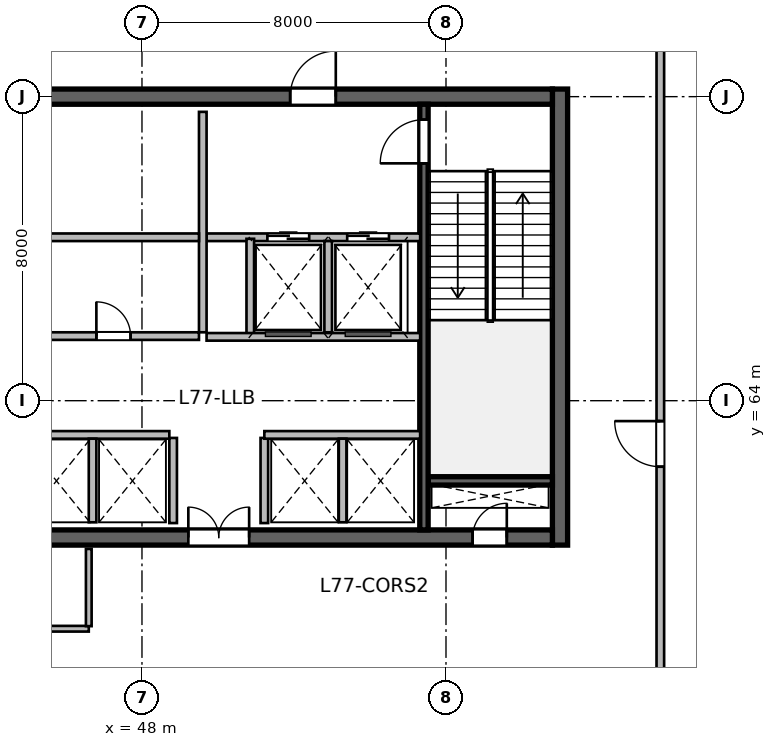
"""IFC4 building model, lengths in metres.
Left out: names, types, materials, properties, quantities, classifications, styles, units other than length and angle.
Written with IfcOpenShell. Run it as: python <this file> out.ifc"""

import sys

from ifc_helpers import new_model, si_unit, direction, frame, frame_2d, origin, place, context, subcontext, project, spatial, rectangle, extrude, source, transform, mapped, element, fill, save


model = new_model("IFC4")
c1 = context("Model", 3, precision=1e-05, world=origin(), true_north=direction((0.0, 1.0)))
c2 = subcontext(c1, "Body", "Model", "MODEL_VIEW")
j1 = project(units=[si_unit("LENGTHUNIT", "METRE"), si_unit("PLANEANGLEUNIT", "RADIAN")], contexts=[c1])
p1 = place(None, origin())
s1 = spatial("IfcSite", under=j1, at=p1, CompositionType="ELEMENT")
p2 = place(p1, origin())
s2 = spatial("IfcBuilding", under=s1, at=p2, CompositionType="ELEMENT")
p3 = place(p2, frame((0.0, 0.0, 318.0)))
s3 = spatial("IfcBuildingStorey", under=s2, at=p3, CompositionType="ELEMENT", Elevation=318.0)
m1 = source(origin(), c2, "Body", "SweptSolid", [
    extrude(rectangle(XDim=12.0, YDim=0.4, at=frame_2d((6.0, 0.0))), origin(), (0.0, 0.0, 1.0), 5.4),
])
p4 = place(p3, frame((59.0, 60.2, 0.0), z_axis=(0.0, 0.0, 1.0), x_axis=(0.0, 1.0, 0.0)))
e1 = element("IfcWall", 1, at=p4, inside=s3, PredefinedType="SHEAR", context=c2, shape_type="MappedRepresentation", body=[
    mapped(m1, transform((0.0, 0.0, 0.0), scale=1.0)),
])
m2 = source(origin(), c2, "Body", "SweptSolid", [
    extrude(rectangle(XDim=21.6, YDim=0.4, at=frame_2d((10.8, 0.0))), origin(), (0.0, 0.0, 1.0), 5.4),
])
p5 = place(p3, frame((37.2, 60.4, 0.0), z_axis=(0.0, 0.0, 1.0), x_axis=(1.0, 0.0, 0.0)))
e2 = element("IfcWall", 2, at=p5, inside=s3, PredefinedType="SHEAR", context=c2, shape_type="MappedRepresentation", body=[
    mapped(m2, transform((0.0, 0.0, 0.0), scale=1.0)),
])
p6 = place(p5, frame((1.1, 0.0, 0.0)))
e3 = element("IfcOpeningElement", 3, at=p6, cuts=e2, PredefinedType="OPENING", context=c2, shape_type="SweptSolid", body=[
    extrude(rectangle(XDim=1.15, YDim=2.15, at=frame_2d((0.575, 1.075))), frame((0.0, 0.21, 0.0), z_axis=(0.0, -1.0, 0.0), x_axis=(1.0, 0.0, 0.0)), (0.0, 0.0, 1.0), 0.42),
])
p7 = place(p5, frame((19.5, 0.0, 0.0)))
e4 = element("IfcOpeningElement", 4, at=p7, cuts=e2, PredefinedType="OPENING", context=c2, shape_type="SweptSolid", body=[
    extrude(rectangle(XDim=0.9, YDim=2.1, at=frame_2d((0.45, 1.05))), frame((0.0, 0.21, 0.0), z_axis=(0.0, -1.0, 0.0), x_axis=(1.0, 0.0, 0.0)), (0.0, 0.0, 1.0), 0.42),
])
p8 = place(p5, frame((12.02, 0.0, 0.0)))
e5 = element("IfcOpeningElement", 5, at=p8, cuts=e2, PredefinedType="OPENING", context=c2, shape_type="SweptSolid", body=[
    extrude(rectangle(XDim=1.6, YDim=2.15, at=frame_2d((0.8, 1.075))), frame((0.0, 0.21, 0.0), z_axis=(0.0, -1.0, 0.0), x_axis=(1.0, 0.0, 0.0)), (0.0, 0.0, 1.0), 0.42),
])
p9 = place(p3, frame((37.2, 72.0, 0.0), z_axis=(0.0, 0.0, 1.0), x_axis=(1.0, 0.0, 0.0)))
e6 = element("IfcWall", 6, at=p9, inside=s3, PredefinedType="SHEAR", context=c2, shape_type="MappedRepresentation", body=[
    mapped(m2, transform((0.0, 0.0, 0.0), scale=1.0)),
])
p10 = place(p9, frame((1.2, 0.0, 0.0)))
e7 = element("IfcOpeningElement", 7, at=p10, cuts=e6, PredefinedType="OPENING", context=c2, shape_type="SweptSolid", body=[
    extrude(rectangle(XDim=0.9, YDim=2.1, at=frame_2d((0.45, 1.05))), frame((0.0, 0.21, 0.0), z_axis=(0.0, -1.0, 0.0), x_axis=(1.0, 0.0, 0.0)), (0.0, 0.0, 1.0), 0.42),
])
p11 = place(p9, frame((14.7, 0.0, 0.0)))
e8 = element("IfcOpeningElement", 8, at=p11, cuts=e6, PredefinedType="OPENING", context=c2, shape_type="SweptSolid", body=[
    extrude(rectangle(XDim=1.2, YDim=2.15, at=frame_2d((0.6, 1.075))), frame((0.0, 0.21, 0.0), z_axis=(0.0, -1.0, 0.0), x_axis=(1.0, 0.0, 0.0)), (0.0, 0.0, 1.0), 0.42),
])
p12 = place(p9, frame((4.15, 0.0, 0.0)))
e9 = element("IfcOpeningElement", 9, at=p12, cuts=e6, PredefinedType="OPENING", context=c2, shape_type="SweptSolid", body=[
    extrude(rectangle(XDim=1.3, YDim=2.15, at=frame_2d((0.65, 1.075))), frame((0.0, 0.21, 0.0), z_axis=(0.0, -1.0, 0.0), x_axis=(1.0, 0.0, 0.0)), (0.0, 0.0, 1.0), 0.42),
])
p13 = place(p9, frame((7.25, 0.0, 0.0)))
e10 = element("IfcOpeningElement", 10, at=p13, cuts=e6, PredefinedType="OPENING", context=c2, shape_type="SweptSolid", body=[
    extrude(rectangle(XDim=0.9, YDim=2.1, at=frame_2d((0.45, 1.05))), frame((0.0, 0.21, 0.0), z_axis=(0.0, -1.0, 0.0), x_axis=(1.0, 0.0, 0.0)), (0.0, 0.0, 1.0), 0.42),
])
m3 = source(origin(), c2, "Body", "SweptSolid", [
    extrude(rectangle(XDim=3.27, YDim=0.22, at=frame_2d((1.635, 0.0))), origin(), (0.0, 0.0, 1.0), 5.4),
])
p14 = place(p3, frame((55.53, 61.89, 0.0), z_axis=(0.0, 0.0, 1.0), x_axis=(1.0, 0.0, 0.0)))
e11 = element("IfcWall", 11, at=p14, inside=s3, PredefinedType="SHEAR", context=c2, shape_type="MappedRepresentation", body=[
    mapped(m3, transform((0.0, 0.0, 0.0), scale=1.0)),
])
m4 = source(origin(), c2, "Body", "SweptSolid", [
    extrude(rectangle(XDim=11.2, YDim=0.22, at=frame_2d((5.6, 0.0))), origin(), (0.0, 0.0, 1.0), 5.4),
])
p15 = place(p3, frame((55.42, 60.6, 0.0), z_axis=(0.0, 0.0, 1.0), x_axis=(0.0, 1.0, 0.0)))
e12 = element("IfcWall", 12, at=p15, inside=s3, PredefinedType="SHEAR", context=c2, shape_type="MappedRepresentation", body=[
    mapped(m4, transform((0.0, 0.0, 0.0), scale=1.0)),
])
p16 = place(p15, frame((9.645, 0.0, 0.0)))
e13 = element("IfcOpeningElement", 13, at=p16, cuts=e12, PredefinedType="OPENING", context=c2, shape_type="SweptSolid", body=[
    extrude(rectangle(XDim=1.15, YDim=2.15, at=frame_2d((0.575, 1.075))), frame((0.0, 0.12, 0.0), z_axis=(0.0, -1.0, 0.0), x_axis=(1.0, 0.0, 0.0)), (0.0, 0.0, 1.0), 0.24),
])
m5 = source(origin(), c2, "Body", "SweptSolid", [
    extrude(rectangle(XDim=1.972, YDim=0.3, at=frame_2d((0.986, 0.0))), origin(), (0.0, 0.0, 1.0), 5.12),
])
p17 = place(p3, frame((62.62, 73.7, 0.0), z_axis=(0.0, 0.0, 1.0), x_axis=(0.878387239208, -0.477949639603, 0.0)))
e14 = element("IfcWall", 14, at=p17, inside=s3, PredefinedType="SOLIDWALL", context=c2, shape_type="MappedRepresentation", body=[
    mapped(m5, transform((0.0, 0.0, 0.0), scale=1.0)),
])
m6 = source(origin(), c2, "Body", "SweptSolid", [
    extrude(rectangle(XDim=2.24, YDim=0.2, at=frame_2d((1.12, 0.0))), origin(), (0.0, 0.0, 1.0), 5.12),
])
for number, where, z_axis, x_axis in (
    (15, (48.82, 60.78, 0.0), (0.0, 0.0, 1.0), (0.0, 1.0, 0.0)),
    (16, (51.22, 60.78, 0.0), (0.0, 0.0, 1.0), (0.0, 1.0, 0.0)),
):
    element("IfcWall", number, at=place(p3, frame(where, z_axis=z_axis, x_axis=x_axis)), inside=s3, PredefinedType="SOLIDWALL", context=c2, shape_type="MappedRepresentation", body=[
        mapped(m6, transform((0.0, 0.0, 0.0), scale=1.0)),
    ])
m7 = source(origin(), c2, "Body", "SweptSolid", [
    extrude(rectangle(XDim=5.62, YDim=0.2, at=frame_2d((2.81, 0.0))), origin(), (0.0, 0.0, 1.0), 5.12),
])
p18 = place(p3, frame((49.7, 68.3, 0.0), z_axis=(0.0, 0.0, 1.0), x_axis=(1.0, 0.0, 0.0)))
e17 = element("IfcWall", 17, at=p18, inside=s3, PredefinedType="SOLIDWALL", context=c2, shape_type="MappedRepresentation", body=[
    mapped(m7, transform((0.0, 0.0, 0.0), scale=1.0)),
])
p19 = place(p18, frame((1.6, 0.0, 0.0)))
e18 = element("IfcOpeningElement", 18, at=p19, cuts=e17, PredefinedType="OPENING", context=c2, shape_type="SweptSolid", body=[
    extrude(rectangle(XDim=1.1, YDim=2.15, at=frame_2d((0.55, 1.075))), frame((0.0, 0.11, 0.0), z_axis=(0.0, -1.0, 0.0), x_axis=(1.0, 0.0, 0.0)), (0.0, 0.0, 1.0), 0.22),
])
p20 = place(p18, frame((3.7, 0.0, 0.0)))
e19 = element("IfcOpeningElement", 19, at=p20, cuts=e17, PredefinedType="OPENING", context=c2, shape_type="SweptSolid", body=[
    extrude(rectangle(XDim=1.1, YDim=2.15, at=frame_2d((0.55, 1.075))), frame((0.0, 0.11, 0.0), z_axis=(0.0, -1.0, 0.0), x_axis=(1.0, 0.0, 0.0)), (0.0, 0.0, 1.0), 0.22),
])
m8 = source(origin(), c2, "Body", "SweptSolid", [
    extrude(rectangle(XDim=5.8, YDim=0.2, at=frame_2d((2.9, 0.0))), origin(), (0.0, 0.0, 1.0), 5.12),
])
p21 = place(p3, frame((49.6, 65.8, 0.0), z_axis=(0.0, 0.0, 1.0), x_axis=(0.0, 1.0, 0.0)))
e20 = element("IfcWall", 20, at=p21, inside=s3, PredefinedType="SOLIDWALL", context=c2, shape_type="MappedRepresentation", body=[
    mapped(m8, transform((0.0, 0.0, 0.0), scale=1.0)),
])
m9 = source(origin(), c2, "Body", "SweptSolid", [
    extrude(rectangle(XDim=2.58, YDim=0.2, at=frame_2d((1.29, 0.0))), origin(), (0.0, 0.0, 1.0), 5.12),
])
p22 = place(p3, frame((50.85, 65.68, 0.0), z_axis=(0.0, 0.0, 1.0), x_axis=(0.0, 1.0, 0.0)))
e21 = element("IfcWall", 21, at=p22, inside=s3, PredefinedType="SOLIDWALL", context=c2, shape_type="MappedRepresentation", body=[
    mapped(m9, transform((0.0, 0.0, 0.0), scale=1.0)),
])
m10 = source(origin(), c2, "Body", "SweptSolid", [
    extrude(rectangle(XDim=2.4, YDim=0.2, at=frame_2d((1.2, 0.0))), origin(), (0.0, 0.0, 1.0), 5.12),
])
p23 = place(p3, frame((52.9, 65.8, 0.0), z_axis=(0.0, 0.0, 1.0), x_axis=(0.0, 1.0, 0.0)))
e22 = element("IfcWall", 22, at=p23, inside=s3, PredefinedType="SOLIDWALL", context=c2, shape_type="MappedRepresentation", body=[
    mapped(m10, transform((0.0, 0.0, 0.0), scale=1.0)),
])
p24 = place(p3, frame((49.7, 65.68, 0.0), z_axis=(0.0, 0.0, 1.0), x_axis=(1.0, 0.0, 0.0)))
e23 = element("IfcWall", 23, at=p24, inside=s3, PredefinedType="SOLIDWALL", context=c2, shape_type="MappedRepresentation", body=[
    mapped(m7, transform((0.0, 0.0, 0.0), scale=1.0)),
])
m11 = source(origin(), c2, "Body", "SweptSolid", [
    extrude(rectangle(XDim=8.8, YDim=0.2, at=frame_2d((4.4, 0.0))), origin(), (0.0, 0.0, 1.0), 5.12),
])
p25 = place(p3, frame((40.7, 68.3, 0.0), z_axis=(0.0, 0.0, 1.0), x_axis=(1.0, 0.0, 0.0)))
e24 = element("IfcWall", 24, at=p25, inside=s3, PredefinedType="SOLIDWALL", context=c2, shape_type="MappedRepresentation", body=[
    mapped(m11, transform((0.0, 0.0, 0.0), scale=1.0)),
])
m12 = source(origin(), c2, "Body", "SweptSolid", [
    extrude(rectangle(XDim=8.02, YDim=0.2, at=frame_2d((4.01, 0.0))), origin(), (0.0, 0.0, 1.0), 5.12),
])
p26 = place(p3, frame((40.7, 63.1, 0.0), z_axis=(0.0, 0.0, 1.0), x_axis=(1.0, 0.0, 0.0)))
e25 = element("IfcWall", 25, at=p26, inside=s3, PredefinedType="SOLIDWALL", context=c2, shape_type="MappedRepresentation", body=[
    mapped(m12, transform((0.0, 0.0, 0.0), scale=1.0)),
])
m13 = source(origin(), c2, "Body", "SweptSolid", [
    extrude(rectangle(XDim=4.1, YDim=0.2, at=frame_2d((2.05, 0.0))), origin(), (0.0, 0.0, 1.0), 5.12),
])
p27 = place(p3, frame((51.22, 63.1, 0.0), z_axis=(0.0, 0.0, 1.0), x_axis=(1.0, 0.0, 0.0)))
e26 = element("IfcWall", 26, at=p27, inside=s3, PredefinedType="SOLIDWALL", context=c2, shape_type="MappedRepresentation", body=[
    mapped(m13, transform((0.0, 0.0, 0.0), scale=1.0)),
])
m14 = source(origin(), c2, "Body", "SweptSolid", [
    extrude(rectangle(XDim=2.2, YDim=0.2, at=frame_2d((1.1, 0.0))), origin(), (0.0, 0.0, 1.0), 5.12),
])
for number, where, z_axis, x_axis in (
    (27, (46.7, 60.8, 0.0), (0.0, 0.0, 1.0), (0.0, 1.0, 0.0)),
    (28, (53.28, 60.8, 0.0), (0.0, 0.0, 1.0), (0.0, 1.0, 0.0)),
):
    element("IfcWall", number, at=place(p3, frame(where, z_axis=z_axis, x_axis=x_axis)), inside=s3, PredefinedType="SOLIDWALL", context=c2, shape_type="MappedRepresentation", body=[
        mapped(m14, transform((0.0, 0.0, 0.0), scale=1.0)),
    ])
p28 = place(p3, frame((40.7, 65.7, 0.0), z_axis=(0.0, 0.0, 1.0), x_axis=(1.0, 0.0, 0.0)))
e29 = element("IfcWall", 29, at=p28, inside=s3, PredefinedType="SOLIDWALL", context=c2, shape_type="MappedRepresentation", body=[
    mapped(m11, transform((0.0, 0.0, 0.0), scale=1.0)),
])
p29 = place(p28, frame((1.6, 0.0, 0.0)))
e30 = element("IfcOpeningElement", 30, at=p29, cuts=e29, PredefinedType="OPENING", context=c2, shape_type="SweptSolid", body=[
    extrude(rectangle(XDim=0.9, YDim=2.1, at=frame_2d((0.45, 1.05))), frame((0.0, 0.11, 0.0), z_axis=(0.0, -1.0, 0.0), x_axis=(1.0, 0.0, 0.0)), (0.0, 0.0, 1.0), 0.22),
])
p30 = place(p28, frame((6.1, 0.0, 0.0)))
e31 = element("IfcOpeningElement", 31, at=p30, cuts=e29, PredefinedType="OPENING", context=c2, shape_type="SweptSolid", body=[
    extrude(rectangle(XDim=0.9, YDim=2.1, at=frame_2d((0.45, 1.05))), frame((0.0, 0.11, 0.0), z_axis=(0.0, -1.0, 0.0), x_axis=(1.0, 0.0, 0.0)), (0.0, 0.0, 1.0), 0.22),
])
m15 = source(origin(), c2, "Body", "SweptSolid", [
    extrude(rectangle(XDim=5.4, YDim=0.15, at=frame_2d((2.7, 0.0))), origin(), (0.0, 0.0, 1.0), 5.12),
])
p31 = place(p3, frame((41.2, 58.0, 0.0), z_axis=(0.0, 0.0, 1.0), x_axis=(1.0, 0.0, 0.0)))
e32 = element("IfcWall", 32, at=p31, inside=s3, PredefinedType="PARTITIONING", context=c2, shape_type="MappedRepresentation", body=[
    mapped(m15, transform((0.0, 0.0, 0.0), scale=1.0)),
])
p32 = place(p31, frame((0.488, 0.0, 0.0)))
e33 = element("IfcOpeningElement", 33, at=p32, cuts=e32, PredefinedType="OPENING", context=c2, shape_type="SweptSolid", body=[
    extrude(rectangle(XDim=1.4, YDim=2.15, at=frame_2d((0.7, 1.075))), frame((0.0, 0.085, 0.0), z_axis=(0.0, -1.0, 0.0), x_axis=(1.0, 0.0, 0.0)), (0.0, 0.0, 1.0), 0.17),
])
m16 = source(origin(), c2, "Body", "SweptSolid", [
    extrude(rectangle(XDim=2.033, YDim=0.15, at=frame_2d((1.016, 0.0))), origin(), (0.0, 0.0, 1.0), 5.12),
])
p33 = place(p3, frame((46.6, 58.067, 0.0), z_axis=(0.0, 0.0, 1.0), x_axis=(0.0, 1.0, 0.0)))
e34 = element("IfcWall", 34, at=p33, inside=s3, PredefinedType="PARTITIONING", context=c2, shape_type="MappedRepresentation", body=[
    mapped(m16, transform((0.0, 0.0, 0.0), scale=1.0)),
])
m17 = source(origin(), c2, "Body", "SweptSolid", [
    extrude(rectangle(XDim=22.582, YDim=0.2, at=frame_2d((11.291, 0.0))), origin(), (0.0, 0.0, 1.0), 5.12),
])
p34 = place(p3, frame((61.64, 51.572, 0.0), z_axis=(0.0, 0.0, 1.0), x_axis=(0.0, 1.0, 0.0)))
e35 = element("IfcWall", 35, at=p34, inside=s3, PredefinedType="SOLIDWALL", context=c2, shape_type="MappedRepresentation", body=[
    mapped(m17, transform((0.0, 0.0, 0.0), scale=1.0)),
])
p35 = place(p34, frame((10.691, 0.0, 0.0)))
e36 = element("IfcOpeningElement", 36, at=p35, cuts=e35, PredefinedType="OPENING", context=c2, shape_type="SweptSolid", body=[
    extrude(rectangle(XDim=1.2, YDim=2.15, at=frame_2d((0.6, 1.075))), frame((0.0, 0.11, 0.0), z_axis=(0.0, -1.0, 0.0), x_axis=(1.0, 0.0, 0.0)), (0.0, 0.0, 1.0), 0.22),
])
m18 = source(origin(), c2, "Body", "SweptSolid", [
    extrude(rectangle(XDim=0.9, YDim=2.1, at=frame_2d((0.45, 1.05))), frame((0.0, 0.025, 0.0), z_axis=(0.0, -1.0, 0.0), x_axis=(1.0, 0.0, 0.0)), (0.0, 0.0, 1.0), 0.05),
])
p36 = place(p7, origin())
e37 = element("IfcDoor", 37, at=p36, inside=s3, OperationType="SINGLE_SWING_RIGHT", PredefinedType="DOOR", context=c2, shape_type="MappedRepresentation", body=[
    mapped(m18, transform((0.0, 0.0, 0.0), scale=1.0)),
])
fill(e4, e37)
m19 = source(origin(), c2, "Body", "SweptSolid", [
    extrude(rectangle(XDim=1.15, YDim=2.15, at=frame_2d((0.575, 1.075))), frame((0.0, 0.025, 0.0), z_axis=(0.0, -1.0, 0.0), x_axis=(1.0, 0.0, 0.0)), (0.0, 0.0, 1.0), 0.05),
])
p37 = place(p16, origin())
e38 = element("IfcDoor", 38, at=p37, inside=s3, OperationType="SINGLE_SWING_LEFT", PredefinedType="DOOR", context=c2, shape_type="MappedRepresentation", body=[
    mapped(m19, transform((0.0, 0.0, 0.0), scale=1.0)),
])
fill(e13, e38)
m20 = source(origin(), c2, "Body", "SweptSolid", [
    extrude(rectangle(XDim=1.6, YDim=2.15, at=frame_2d((0.8, 1.075))), frame((0.0, 0.025, 0.0), z_axis=(0.0, -1.0, 0.0), x_axis=(1.0, 0.0, 0.0)), (0.0, 0.0, 1.0), 0.05),
])
p38 = place(p8, origin())
e39 = element("IfcDoor", 39, at=p38, inside=s3, OperationType="DOUBLE_DOOR_SINGLE_SWING", PredefinedType="DOOR", context=c2, shape_type="MappedRepresentation", body=[
    mapped(m20, transform((0.0, 0.0, 0.0), scale=1.0)),
])
fill(e5, e39)
m21 = source(origin(), c2, "Body", "SweptSolid", [
    extrude(rectangle(XDim=1.2, YDim=2.15, at=frame_2d((0.6, 1.075))), frame((0.0, 0.025, 0.0), z_axis=(0.0, -1.0, 0.0), x_axis=(1.0, 0.0, 0.0)), (0.0, 0.0, 1.0), 0.05),
])
p39 = place(p11, origin())
e40 = element("IfcDoor", 40, at=p39, inside=s3, OperationType="SINGLE_SWING_RIGHT", PredefinedType="DOOR", context=c2, shape_type="MappedRepresentation", body=[
    mapped(m21, transform((0.0, 0.0, 0.0), scale=1.0)),
])
fill(e8, e40)
m22 = source(origin(), c2, "Body", "SweptSolid", [
    extrude(rectangle(XDim=1.1, YDim=2.15, at=frame_2d((0.55, 1.075))), frame((0.0, 0.025, 0.0), z_axis=(0.0, -1.0, 0.0), x_axis=(1.0, 0.0, 0.0)), (0.0, 0.0, 1.0), 0.05),
])
p40 = place(p19, origin())
e41 = element("IfcDoor", 41, at=p40, inside=s3, OperationType="DOUBLE_DOOR_SLIDING", PredefinedType="DOOR", context=c2, shape_type="MappedRepresentation", body=[
    mapped(m22, transform((0.0, 0.0, 0.0), scale=1.0)),
])
fill(e18, e41)
p41 = place(p20, origin())
e42 = element("IfcDoor", 42, at=p41, inside=s3, OperationType="DOUBLE_DOOR_SLIDING", PredefinedType="DOOR", context=c2, shape_type="MappedRepresentation", body=[
    mapped(m22, transform((0.0, 0.0, 0.0), scale=1.0)),
])
fill(e19, e42)
p42 = place(p30, origin())
e43 = element("IfcDoor", 43, at=p42, inside=s3, OperationType="SINGLE_SWING_LEFT", PredefinedType="DOOR", context=c2, shape_type="MappedRepresentation", body=[
    mapped(m18, transform((0.0, 0.0, 0.0), scale=1.0)),
])
fill(e31, e43)
p43 = place(p35, origin())
e44 = element("IfcDoor", 44, at=p43, inside=s3, OperationType="SINGLE_SWING_RIGHT", PredefinedType="DOOR", context=c2, shape_type="MappedRepresentation", body=[
    mapped(m21, transform((0.0, 0.0, 0.0), scale=1.0)),
])
fill(e36, e44)
save(model, sys.argv[1])
